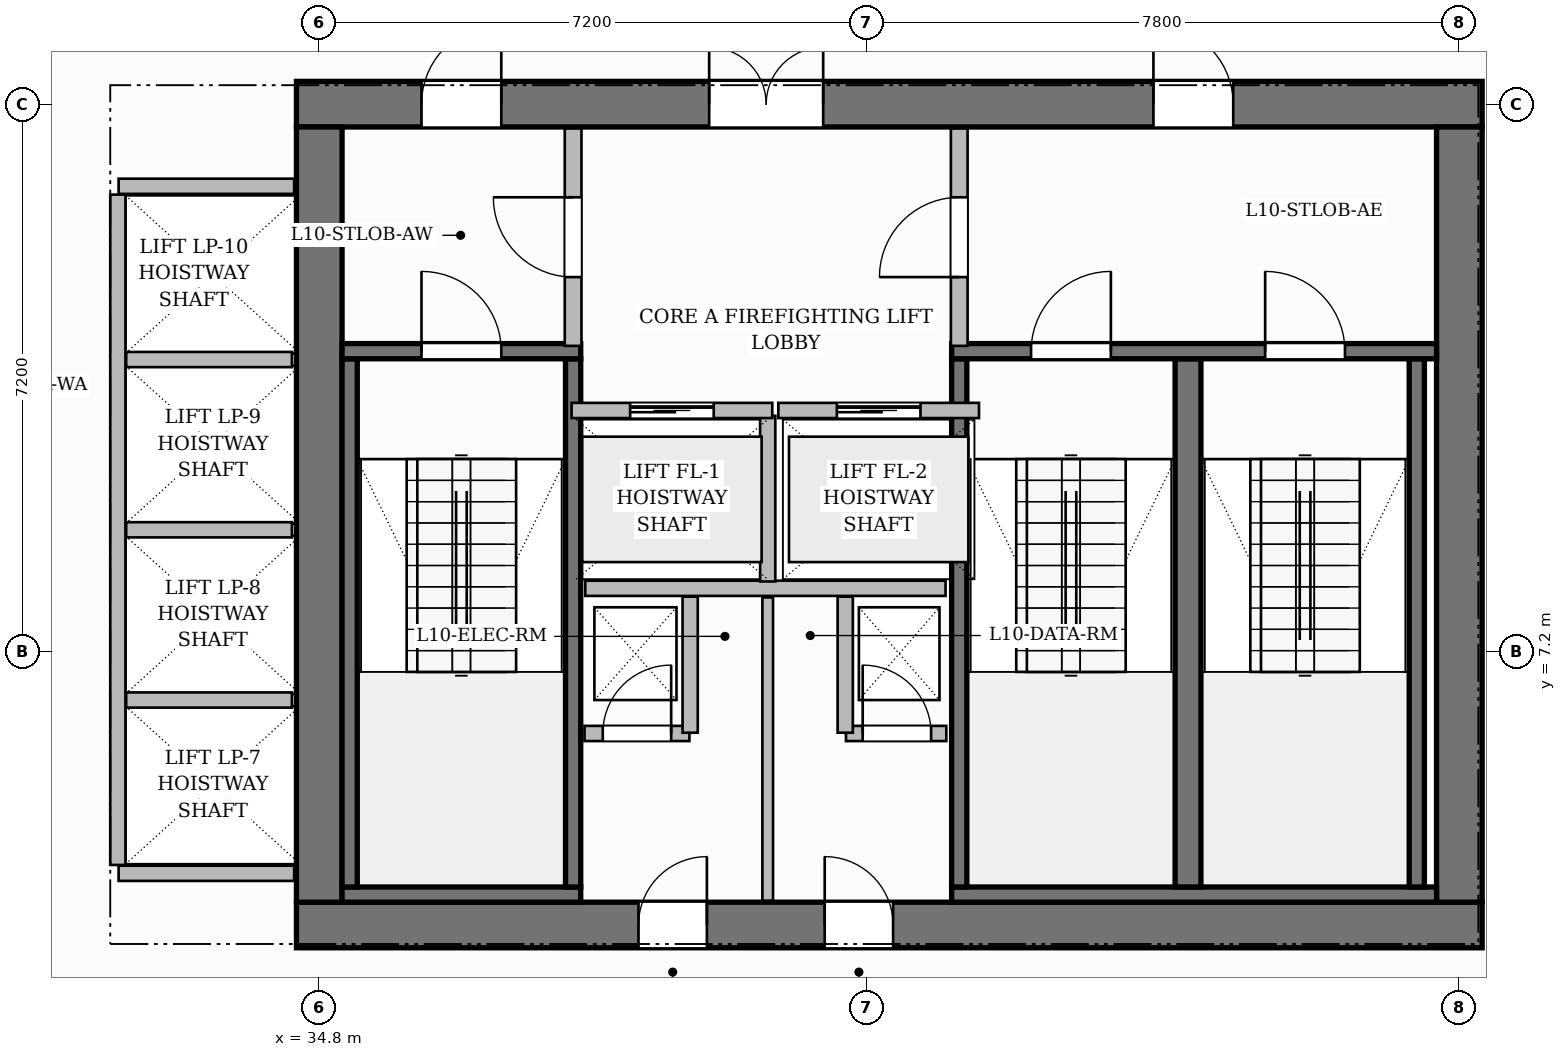
"""IFC4 building model, lengths in metres.
Left out: names, types, materials, properties, quantities, classifications, styles, units other than length and angle.
Written with IfcOpenShell. Run it as: python <this file> out.ifc"""

import sys

from ifc_helpers import new_model, si_unit, direction, frame, frame_2d, origin, place, context, subcontext, project, spatial, rectangle, extrude, source, transform, mapped, element, fill, save


model = new_model("IFC4")
c1 = context("Model", 3, precision=1e-05, world=origin(), true_north=direction((0.0, 1.0)))
c2 = subcontext(c1, "Body", "Model", "MODEL_VIEW")
j1 = project(units=[si_unit("LENGTHUNIT", "METRE"), si_unit("PLANEANGLEUNIT", "RADIAN")], contexts=[c1])
p1 = place(None, origin())
s1 = spatial("IfcSite", under=j1, at=p1, CompositionType="ELEMENT")
p2 = place(p1, origin())
s2 = spatial("IfcBuilding", under=s1, at=p2, CompositionType="ELEMENT")
p3 = place(p2, frame((0.0, 0.0, 47.2)))
s3 = spatial("IfcBuildingStorey", under=s2, at=p3, CompositionType="ELEMENT", Elevation=47.2)
p4 = place(p3, frame((34.5, 3.6, 0.0), z_axis=(0.0, 0.0, 1.0), x_axis=(1.0, 0.0, 0.0)))
e1 = element("IfcWall", 1, at=p4, inside=s3, PredefinedType="SHEAR", context=c2, shape_type="SweptSolid", body=[
    extrude(rectangle(XDim=15.6, YDim=0.6, at=frame_2d((7.8, 0.0))), origin(), (0.0, 0.0, 1.0), 3.7),
])
p5 = place(p4, frame((4.5, 0.0, 0.0)))
e2 = element("IfcOpeningElement", 2, at=p5, cuts=e1, PredefinedType="OPENING", context=c2, shape_type="SweptSolid", body=[
    extrude(rectangle(XDim=0.9, YDim=2.1, at=frame_2d((0.45, 1.05))), frame((0.0, 0.31, 0.0), z_axis=(0.0, -1.0, 0.0), x_axis=(1.0, 0.0, 0.0)), (0.0, 0.0, 1.0), 0.62),
])
p6 = place(p4, frame((6.95, 0.0, 0.0)))
e3 = element("IfcOpeningElement", 3, at=p6, cuts=e1, PredefinedType="OPENING", context=c2, shape_type="SweptSolid", body=[
    extrude(rectangle(XDim=0.9, YDim=2.1, at=frame_2d((0.45, 1.05))), frame((0.0, 0.31, 0.0), z_axis=(0.0, -1.0, 0.0), x_axis=(1.0, 0.0, 0.0)), (0.0, 0.0, 1.0), 0.62),
])
p7 = place(p3, frame((34.5, 14.4, 0.0), z_axis=(0.0, 0.0, 1.0), x_axis=(1.0, 0.0, 0.0)))
e4 = element("IfcWall", 4, at=p7, inside=s3, PredefinedType="SHEAR", context=c2, shape_type="SweptSolid", body=[
    extrude(rectangle(XDim=15.6, YDim=0.6, at=frame_2d((7.8, 0.0))), origin(), (0.0, 0.0, 1.0), 3.7),
])
p8 = place(p7, frame((5.43, 0.0, 0.0)))
e5 = element("IfcOpeningElement", 5, at=p8, cuts=e4, PredefinedType="OPENING", context=c2, shape_type="SweptSolid", body=[
    extrude(rectangle(XDim=1.5, YDim=2.2, at=frame_2d((0.75, 1.1))), frame((0.0, 0.31, 0.0), z_axis=(0.0, -1.0, 0.0), x_axis=(1.0, 0.0, 0.0)), (0.0, 0.0, 1.0), 0.62),
])
p9 = place(p7, frame((1.645, 0.0, 0.0)))
e6 = element("IfcOpeningElement", 6, at=p9, cuts=e4, PredefinedType="OPENING", context=c2, shape_type="SweptSolid", body=[
    extrude(rectangle(XDim=1.05, YDim=2.15, at=frame_2d((0.525, 1.075))), frame((0.0, 0.31, 0.0), z_axis=(0.0, -1.0, 0.0), x_axis=(1.0, 0.0, 0.0)), (0.0, 0.0, 1.0), 0.62),
])
p10 = place(p7, frame((11.275, 0.0, 0.0)))
e7 = element("IfcOpeningElement", 7, at=p10, cuts=e4, PredefinedType="OPENING", context=c2, shape_type="SweptSolid", body=[
    extrude(rectangle(XDim=1.05, YDim=2.15, at=frame_2d((0.525, 1.075))), frame((0.0, 0.31, 0.0), z_axis=(0.0, -1.0, 0.0), x_axis=(1.0, 0.0, 0.0)), (0.0, 0.0, 1.0), 0.62),
])
for number, where, z_axis, x_axis in (
    (8, (34.8, 3.9, 0.0), (0.0, 0.0, 1.0), (0.0, 1.0, 0.0)),
    (9, (49.8, 3.9, 0.0), (0.0, 0.0, 1.0), (0.0, 1.0, 0.0)),
):
    element("IfcWall", number, at=place(p3, frame(where, z_axis=z_axis, x_axis=x_axis)), inside=s3, PredefinedType="SHEAR", context=c2, shape_type="SweptSolid", body=[
        extrude(rectangle(XDim=10.2, YDim=0.6, at=frame_2d((5.1, 0.0))), origin(), (0.0, 0.0, 1.0), 3.7),
    ])
p11 = place(p3, frame((35.1, 4.0, 0.0), z_axis=(0.0, 0.0, 1.0), x_axis=(1.0, 0.0, 0.0)))
e10 = element("IfcWall", 10, at=p11, inside=s3, PredefinedType="SHEAR", context=c2, shape_type="SweptSolid", body=[
    extrude(rectangle(XDim=3.14, YDim=0.2, at=frame_2d((1.57, 0.0))), origin(), (0.0, 0.0, 1.0), 3.7),
])
for number, where, z_axis, x_axis in (
    (11, (35.2, 4.1, 0.0), (0.0, 0.0, 1.0), (0.0, 1.0, 0.0)),
    (12, (38.14, 4.1, 0.0), (0.0, 0.0, 1.0), (0.0, 1.0, 0.0)),
):
    element("IfcWall", number, at=place(p3, frame(where, z_axis=z_axis, x_axis=x_axis)), inside=s3, PredefinedType="SHEAR", context=c2, shape_type="SweptSolid", body=[
        extrude(rectangle(XDim=6.95, YDim=0.2, at=frame_2d((3.475, 0.0))), origin(), (0.0, 0.0, 1.0), 3.7),
    ])
p12 = place(p3, frame((35.1, 11.15, 0.0), z_axis=(0.0, 0.0, 1.0), x_axis=(1.0, 0.0, 0.0)))
e13 = element("IfcWall", 13, at=p12, inside=s3, PredefinedType="SHEAR", context=c2, shape_type="SweptSolid", body=[
    extrude(rectangle(XDim=3.14, YDim=0.2, at=frame_2d((1.57, 0.0))), origin(), (0.0, 0.0, 1.0), 3.7),
])
p13 = place(p12, frame((1.045, 0.0, 0.0)))
e14 = element("IfcOpeningElement", 14, at=p13, cuts=e13, PredefinedType="OPENING", context=c2, shape_type="SweptSolid", body=[
    extrude(rectangle(XDim=1.05, YDim=2.2, at=frame_2d((0.525, 1.1))), frame((0.0, 0.11, 0.0), z_axis=(0.0, -1.0, 0.0), x_axis=(1.0, 0.0, 0.0)), (0.0, 0.0, 1.0), 0.22),
])
p14 = place(p3, frame((43.12, 4.0, 0.0), z_axis=(0.0, 0.0, 1.0), x_axis=(1.0, 0.0, 0.0)))
e15 = element("IfcWall", 15, at=p14, inside=s3, PredefinedType="SHEAR", context=c2, shape_type="SweptSolid", body=[
    extrude(rectangle(XDim=6.38, YDim=0.2, at=frame_2d((3.19, 0.0))), origin(), (0.0, 0.0, 1.0), 3.7),
])
p15 = place(p3, frame((43.22, 4.1, 0.0), z_axis=(0.0, 0.0, 1.0), x_axis=(0.0, 1.0, 0.0)))
e16 = element("IfcWall", 16, at=p15, inside=s3, PredefinedType="SHEAR", context=c2, shape_type="SweptSolid", body=[
    extrude(rectangle(XDim=6.95, YDim=0.2, at=frame_2d((3.475, 0.0))), origin(), (0.0, 0.0, 1.0), 3.7),
])
p16 = place(p3, frame((46.23, 4.1, 0.0), z_axis=(0.0, 0.0, 1.0), x_axis=(0.0, 1.0, 0.0)))
e17 = element("IfcWall", 17, at=p16, inside=s3, PredefinedType="SHEAR", context=c2, shape_type="SweptSolid", body=[
    extrude(rectangle(XDim=6.95, YDim=0.34, at=frame_2d((3.475, 0.0))), origin(), (0.0, 0.0, 1.0), 3.7),
])
p17 = place(p3, frame((49.24, 4.1, 0.0), z_axis=(0.0, 0.0, 1.0), x_axis=(0.0, 1.0, 0.0)))
e18 = element("IfcWall", 18, at=p17, inside=s3, PredefinedType="SHEAR", context=c2, shape_type="SweptSolid", body=[
    extrude(rectangle(XDim=6.95, YDim=0.2, at=frame_2d((3.475, 0.0))), origin(), (0.0, 0.0, 1.0), 3.7),
])
p18 = place(p3, frame((43.12, 11.15, 0.0), z_axis=(0.0, 0.0, 1.0), x_axis=(1.0, 0.0, 0.0)))
e19 = element("IfcWall", 19, at=p18, inside=s3, PredefinedType="SHEAR", context=c2, shape_type="SweptSolid", body=[
    extrude(rectangle(XDim=6.38, YDim=0.2, at=frame_2d((3.19, 0.0))), origin(), (0.0, 0.0, 1.0), 3.7),
])
p19 = place(p18, frame((1.045, 0.0, 0.0)))
e20 = element("IfcOpeningElement", 20, at=p19, cuts=e19, PredefinedType="OPENING", context=c2, shape_type="SweptSolid", body=[
    extrude(rectangle(XDim=1.05, YDim=2.2, at=frame_2d((0.525, 1.1))), frame((0.0, 0.11, 0.0), z_axis=(0.0, -1.0, 0.0), x_axis=(1.0, 0.0, 0.0)), (0.0, 0.0, 1.0), 0.22),
])
p20 = place(p18, frame((4.125, 0.0, 0.0)))
e21 = element("IfcOpeningElement", 21, at=p20, cuts=e19, PredefinedType="OPENING", context=c2, shape_type="SweptSolid", body=[
    extrude(rectangle(XDim=1.05, YDim=2.2, at=frame_2d((0.525, 1.1))), frame((0.0, 0.11, 0.0), z_axis=(0.0, -1.0, 0.0), x_axis=(1.0, 0.0, 0.0)), (0.0, 0.0, 1.0), 0.22),
])
p21 = place(p3, frame((38.3, 8.03, 0.0), z_axis=(0.0, 0.0, 1.0), x_axis=(1.0, 0.0, 0.0)))
e22 = element("IfcWall", 22, at=p21, inside=s3, PredefinedType="PARTITIONING", context=c2, shape_type="SweptSolid", body=[
    extrude(rectangle(XDim=4.74, YDim=0.2, at=frame_2d((2.37, 0.0))), origin(), (0.0, 0.0, 1.0), 3.45),
])
p22 = place(p3, frame((40.7, 8.12, 0.0), z_axis=(0.0, 0.0, 1.0), x_axis=(0.0, 1.0, 0.0)))
e23 = element("IfcWall", 23, at=p22, inside=s3, PredefinedType="PARTITIONING", context=c2, shape_type="SweptSolid", body=[
    extrude(rectangle(XDim=2.18, YDim=0.2, at=frame_2d((1.09, 0.0))), origin(), (0.0, 0.0, 1.0), 3.45),
])
p23 = place(p3, frame((38.14, 11.22, 0.0), z_axis=(0.0, 0.0, 1.0), x_axis=(0.0, 1.0, 0.0)))
e24 = element("IfcWall", 24, at=p23, inside=s3, PredefinedType="PARTITIONING", context=c2, shape_type="SweptSolid", body=[
    extrude(rectangle(XDim=2.86, YDim=0.22, at=frame_2d((1.43, 0.0))), origin(), (0.0, 0.0, 1.0), 3.45),
])
p24 = place(p23, frame((0.905, 0.0, 0.0)))
e25 = element("IfcOpeningElement", 25, at=p24, cuts=e24, PredefinedType="OPENING", context=c2, shape_type="SweptSolid", body=[
    extrude(rectangle(XDim=1.05, YDim=2.15, at=frame_2d((0.525, 1.075))), frame((0.0, 0.12, 0.0), z_axis=(0.0, -1.0, 0.0), x_axis=(1.0, 0.0, 0.0)), (0.0, 0.0, 1.0), 0.24),
])
p25 = place(p3, frame((43.22, 11.22, 0.0), z_axis=(0.0, 0.0, 1.0), x_axis=(0.0, 1.0, 0.0)))
e26 = element("IfcWall", 26, at=p25, inside=s3, PredefinedType="PARTITIONING", context=c2, shape_type="SweptSolid", body=[
    extrude(rectangle(XDim=2.86, YDim=0.22, at=frame_2d((1.43, 0.0))), origin(), (0.0, 0.0, 1.0), 3.45),
])
p26 = place(p25, frame((0.905, 0.0, 0.0)))
e27 = element("IfcOpeningElement", 27, at=p26, cuts=e26, PredefinedType="OPENING", context=c2, shape_type="SweptSolid", body=[
    extrude(rectangle(XDim=1.05, YDim=2.15, at=frame_2d((0.525, 1.075))), frame((0.0, 0.12, 0.0), z_axis=(0.0, -1.0, 0.0), x_axis=(1.0, 0.0, 0.0)), (0.0, 0.0, 1.0), 0.24),
])
p27 = place(p3, frame((38.29, 6.12, 0.0), z_axis=(0.0, 0.0, 1.0), x_axis=(1.0, 0.0, 0.0)))
e28 = element("IfcWall", 28, at=p27, inside=s3, PredefinedType="PARTITIONING", context=c2, shape_type="SweptSolid", body=[
    extrude(rectangle(XDim=1.38, YDim=0.2, at=frame_2d((0.69, 0.0))), origin(), (0.0, 0.0, 1.0), 3.45),
])
p28 = place(p27, frame((0.24, 0.0, 0.0)))
e29 = element("IfcOpeningElement", 29, at=p28, cuts=e28, PredefinedType="OPENING", context=c2, shape_type="SweptSolid", body=[
    extrude(rectangle(XDim=0.9, YDim=2.1, at=frame_2d((0.45, 1.05))), frame((0.0, 0.11, 0.0), z_axis=(0.0, -1.0, 0.0), x_axis=(1.0, 0.0, 0.0)), (0.0, 0.0, 1.0), 0.22),
])
p29 = place(p3, frame((39.68, 6.13, 0.0), z_axis=(0.0, 0.0, 1.0), x_axis=(0.0, 1.0, 0.0)))
e30 = element("IfcWall", 30, at=p29, inside=s3, PredefinedType="PARTITIONING", context=c2, shape_type="SweptSolid", body=[
    extrude(rectangle(XDim=1.79, YDim=0.2, at=frame_2d((0.895, 0.0))), origin(), (0.0, 0.0, 1.0), 3.45),
])
p30 = place(p3, frame((41.73, 6.12, 0.0), z_axis=(0.0, 0.0, 1.0), x_axis=(1.0, 0.0, 0.0)))
e31 = element("IfcWall", 31, at=p30, inside=s3, PredefinedType="PARTITIONING", context=c2, shape_type="SweptSolid", body=[
    extrude(rectangle(XDim=1.32, YDim=0.2, at=frame_2d((0.66, 0.0))), origin(), (0.0, 0.0, 1.0), 3.45),
])
p31 = place(p30, frame((0.22, 0.0, 0.0)))
e32 = element("IfcOpeningElement", 32, at=p31, cuts=e31, PredefinedType="OPENING", context=c2, shape_type="SweptSolid", body=[
    extrude(rectangle(XDim=0.9, YDim=2.1, at=frame_2d((0.45, 1.05))), frame((0.0, 0.11, 0.0), z_axis=(0.0, -1.0, 0.0), x_axis=(1.0, 0.0, 0.0)), (0.0, 0.0, 1.0), 0.22),
])
p32 = place(p3, frame((41.72, 6.13, 0.0), z_axis=(0.0, 0.0, 1.0), x_axis=(0.0, 1.0, 0.0)))
e33 = element("IfcWall", 33, at=p32, inside=s3, PredefinedType="PARTITIONING", context=c2, shape_type="SweptSolid", body=[
    extrude(rectangle(XDim=1.79, YDim=0.2, at=frame_2d((0.895, 0.0))), origin(), (0.0, 0.0, 1.0), 3.45),
])
p33 = place(p3, frame((40.7, 3.92, 0.0), z_axis=(0.0, 0.0, 1.0), x_axis=(0.0, 1.0, 0.0)))
e34 = element("IfcWall", 34, at=p33, inside=s3, PredefinedType="PARTITIONING", context=c2, shape_type="SweptSolid", body=[
    extrude(rectangle(XDim=3.99, YDim=0.14, at=frame_2d((1.995, 0.0))), origin(), (0.0, 0.0, 1.0), 3.45),
])
for number, where, z_axis, x_axis in (
    (35, (32.16, 4.28, 0.0), (0.0, 0.0, 1.0), (1.0, 0.0, 0.0)),
    (36, (32.16, 13.32, 0.0), (0.0, 0.0, 1.0), (1.0, 0.0, 0.0)),
):
    element("IfcWall", number, at=place(p3, frame(where, z_axis=z_axis, x_axis=x_axis)), inside=s3, PredefinedType="PARTITIONING", context=c2, shape_type="SweptSolid", body=[
        extrude(rectangle(XDim=2.31, YDim=0.2, at=frame_2d((1.155, 0.0))), origin(), (0.0, 0.0, 1.0), 3.45),
    ])
p34 = place(p3, frame((32.15, 4.39, 0.0), z_axis=(0.0, 0.0, 1.0), x_axis=(0.0, 1.0, 0.0)))
e37 = element("IfcWall", 37, at=p34, inside=s3, PredefinedType="PARTITIONING", context=c2, shape_type="SweptSolid", body=[
    extrude(rectangle(XDim=8.82, YDim=0.2, at=frame_2d((4.41, 0.0))), origin(), (0.0, 0.0, 1.0), 3.45),
])
for number, where, z_axis, x_axis in (
    (38, (32.26, 6.56, 0.0), (0.0, 0.0, 1.0), (1.0, 0.0, 0.0)),
    (39, (32.26, 8.8, 0.0), (0.0, 0.0, 1.0), (1.0, 0.0, 0.0)),
    (40, (32.26, 11.04, 0.0), (0.0, 0.0, 1.0), (1.0, 0.0, 0.0)),
):
    element("IfcWall", number, at=place(p3, frame(where, z_axis=z_axis, x_axis=x_axis)), inside=s3, PredefinedType="PARTITIONING", context=c2, shape_type="SweptSolid", body=[
        extrude(rectangle(XDim=2.18, YDim=0.2, at=frame_2d((1.09, 0.0))), origin(), (0.0, 0.0, 1.0), 3.45),
    ])
p35 = place(p3, frame((38.12, 10.37, 0.0), z_axis=(0.0, 0.0, 1.0), x_axis=(1.0, 0.0, 0.0)))
e41 = element("IfcWall", 41, at=p35, inside=s3, PredefinedType="PARTITIONING", context=c2, shape_type="SweptSolid", body=[
    extrude(rectangle(XDim=2.64, YDim=0.2, at=frame_2d((1.32, 0.0))), origin(), (0.0, 0.0, 1.0), 3.45),
])
p36 = place(p35, frame((0.77, 0.0, 0.0)))
e42 = element("IfcOpeningElement", 42, at=p36, cuts=e41, PredefinedType="OPENING", context=c2, shape_type="SweptSolid", body=[
    extrude(rectangle(XDim=1.1, YDim=2.2, at=frame_2d((0.55, 1.1))), frame((0.0, 0.11, 0.0), z_axis=(0.0, -1.0, 0.0), x_axis=(1.0, 0.0, 0.0)), (0.0, 0.0, 1.0), 0.22),
])
p37 = place(p3, frame((40.84, 10.37, 0.0), z_axis=(0.0, 0.0, 1.0), x_axis=(1.0, 0.0, 0.0)))
e43 = element("IfcWall", 43, at=p37, inside=s3, PredefinedType="PARTITIONING", context=c2, shape_type="SweptSolid", body=[
    extrude(rectangle(XDim=2.64, YDim=0.2, at=frame_2d((1.32, 0.0))), origin(), (0.0, 0.0, 1.0), 3.45),
])
p38 = place(p37, frame((0.77, 0.0, 0.0)))
e44 = element("IfcOpeningElement", 44, at=p38, cuts=e43, PredefinedType="OPENING", context=c2, shape_type="SweptSolid", body=[
    extrude(rectangle(XDim=1.1, YDim=2.2, at=frame_2d((0.55, 1.1))), frame((0.0, 0.11, 0.0), z_axis=(0.0, -1.0, 0.0), x_axis=(1.0, 0.0, 0.0)), (0.0, 0.0, 1.0), 0.22),
])
m1 = source(origin(), c2, "Body", "SweptSolid", [
    extrude(rectangle(XDim=1.05, YDim=2.2, at=frame_2d((0.525, 1.1))), frame((0.0, 0.025, 0.0), z_axis=(0.0, -1.0, 0.0), x_axis=(1.0, 0.0, 0.0)), (0.0, 0.0, 1.0), 0.05),
])
p39 = place(p13, origin())
e45 = element("IfcDoor", 45, at=p39, inside=s3, OperationType="SINGLE_SWING_LEFT", PredefinedType="DOOR", context=c2, shape_type="MappedRepresentation", body=[
    mapped(m1, transform((0.0, 0.0, 0.0), scale=1.0)),
])
fill(e14, e45)
p40 = place(p19, origin())
e46 = element("IfcDoor", 46, at=p40, inside=s3, OperationType="SINGLE_SWING_RIGHT", PredefinedType="DOOR", context=c2, shape_type="MappedRepresentation", body=[
    mapped(m1, transform((0.0, 0.0, 0.0), scale=1.0)),
])
fill(e20, e46)
p41 = place(p20, origin())
e47 = element("IfcDoor", 47, at=p41, inside=s3, OperationType="SINGLE_SWING_LEFT", PredefinedType="DOOR", context=c2, shape_type="MappedRepresentation", body=[
    mapped(m1, transform((0.0, 0.0, 0.0), scale=1.0)),
])
fill(e21, e47)
m2 = source(origin(), c2, "Body", "SweptSolid", [
    extrude(rectangle(XDim=1.05, YDim=2.15, at=frame_2d((0.525, 1.075))), frame((0.0, 0.025, 0.0), z_axis=(0.0, -1.0, 0.0), x_axis=(1.0, 0.0, 0.0)), (0.0, 0.0, 1.0), 0.05),
])
p42 = place(p24, origin())
e48 = element("IfcDoor", 48, at=p42, inside=s3, OperationType="SINGLE_SWING_RIGHT", PredefinedType="DOOR", context=c2, shape_type="MappedRepresentation", body=[
    mapped(m2, transform((0.0, 0.0, 0.0), scale=1.0)),
])
fill(e25, e48)
p43 = place(p26, origin())
e49 = element("IfcDoor", 49, at=p43, inside=s3, OperationType="SINGLE_SWING_LEFT", PredefinedType="DOOR", context=c2, shape_type="MappedRepresentation", body=[
    mapped(m2, transform((0.0, 0.0, 0.0), scale=1.0)),
])
fill(e27, e49)
m3 = source(origin(), c2, "Body", "SweptSolid", [
    extrude(rectangle(XDim=1.5, YDim=2.2, at=frame_2d((0.75, 1.1))), frame((0.0, 0.025, 0.0), z_axis=(0.0, -1.0, 0.0), x_axis=(1.0, 0.0, 0.0)), (0.0, 0.0, 1.0), 0.05),
])
p44 = place(p8, origin())
e50 = element("IfcDoor", 50, at=p44, inside=s3, OperationType="DOUBLE_DOOR_SINGLE_SWING", PredefinedType="DOOR", context=c2, shape_type="MappedRepresentation", body=[
    mapped(m3, transform((0.0, 0.0, 0.0), scale=1.0)),
])
fill(e5, e50)
p45 = place(p9, origin())
e51 = element("IfcDoor", 51, at=p45, inside=s3, OperationType="SINGLE_SWING_RIGHT", PredefinedType="DOOR", context=c2, shape_type="MappedRepresentation", body=[
    mapped(m2, transform((0.0, 0.0, 0.0), scale=1.0)),
])
fill(e6, e51)
p46 = place(p10, origin())
e52 = element("IfcDoor", 52, at=p46, inside=s3, OperationType="SINGLE_SWING_LEFT", PredefinedType="DOOR", context=c2, shape_type="MappedRepresentation", body=[
    mapped(m2, transform((0.0, 0.0, 0.0), scale=1.0)),
])
fill(e7, e52)
m4 = source(origin(), c2, "Body", "SweptSolid", [
    extrude(rectangle(XDim=0.9, YDim=2.1, at=frame_2d((0.45, 1.05))), frame((0.0, 0.025, 0.0), z_axis=(0.0, -1.0, 0.0), x_axis=(1.0, 0.0, 0.0)), (0.0, 0.0, 1.0), 0.05),
])
p47 = place(p28, origin())
e53 = element("IfcDoor", 53, at=p47, inside=s3, OperationType="SINGLE_SWING_RIGHT", PredefinedType="DOOR", context=c2, shape_type="MappedRepresentation", body=[
    mapped(m4, transform((0.0, 0.0, 0.0), scale=1.0)),
])
fill(e29, e53)
p48 = place(p31, origin())
e54 = element("IfcDoor", 54, at=p48, inside=s3, OperationType="SINGLE_SWING_LEFT", PredefinedType="DOOR", context=c2, shape_type="MappedRepresentation", body=[
    mapped(m4, transform((0.0, 0.0, 0.0), scale=1.0)),
])
fill(e32, e54)
p49 = place(p5, origin())
e55 = element("IfcDoor", 55, at=p49, inside=s3, OperationType="SINGLE_SWING_RIGHT", PredefinedType="DOOR", context=c2, shape_type="MappedRepresentation", body=[
    mapped(m4, transform((0.0, 0.0, 0.0), scale=1.0)),
])
fill(e2, e55)
p50 = place(p6, origin())
e56 = element("IfcDoor", 56, at=p50, inside=s3, OperationType="SINGLE_SWING_LEFT", PredefinedType="DOOR", context=c2, shape_type="MappedRepresentation", body=[
    mapped(m4, transform((0.0, 0.0, 0.0), scale=1.0)),
])
fill(e3, e56)
m5 = source(origin(), c2, "Body", "SweptSolid", [
    extrude(rectangle(XDim=1.1, YDim=2.2, at=frame_2d((0.55, 1.1))), frame((0.0, 0.025, 0.0), z_axis=(0.0, -1.0, 0.0), x_axis=(1.0, 0.0, 0.0)), (0.0, 0.0, 1.0), 0.05),
])
p51 = place(p36, origin())
e57 = element("IfcDoor", 57, at=p51, inside=s3, OperationType="SLIDING_TO_LEFT", PredefinedType="DOOR", context=c2, shape_type="MappedRepresentation", body=[
    mapped(m5, transform((0.0, 0.0, 0.0), scale=1.0)),
])
fill(e42, e57)
p52 = place(p38, origin())
e58 = element("IfcDoor", 58, at=p52, inside=s3, OperationType="SLIDING_TO_LEFT", PredefinedType="DOOR", context=c2, shape_type="MappedRepresentation", body=[
    mapped(m5, transform((0.0, 0.0, 0.0), scale=1.0)),
])
fill(e44, e58)
save(model, sys.argv[1])
